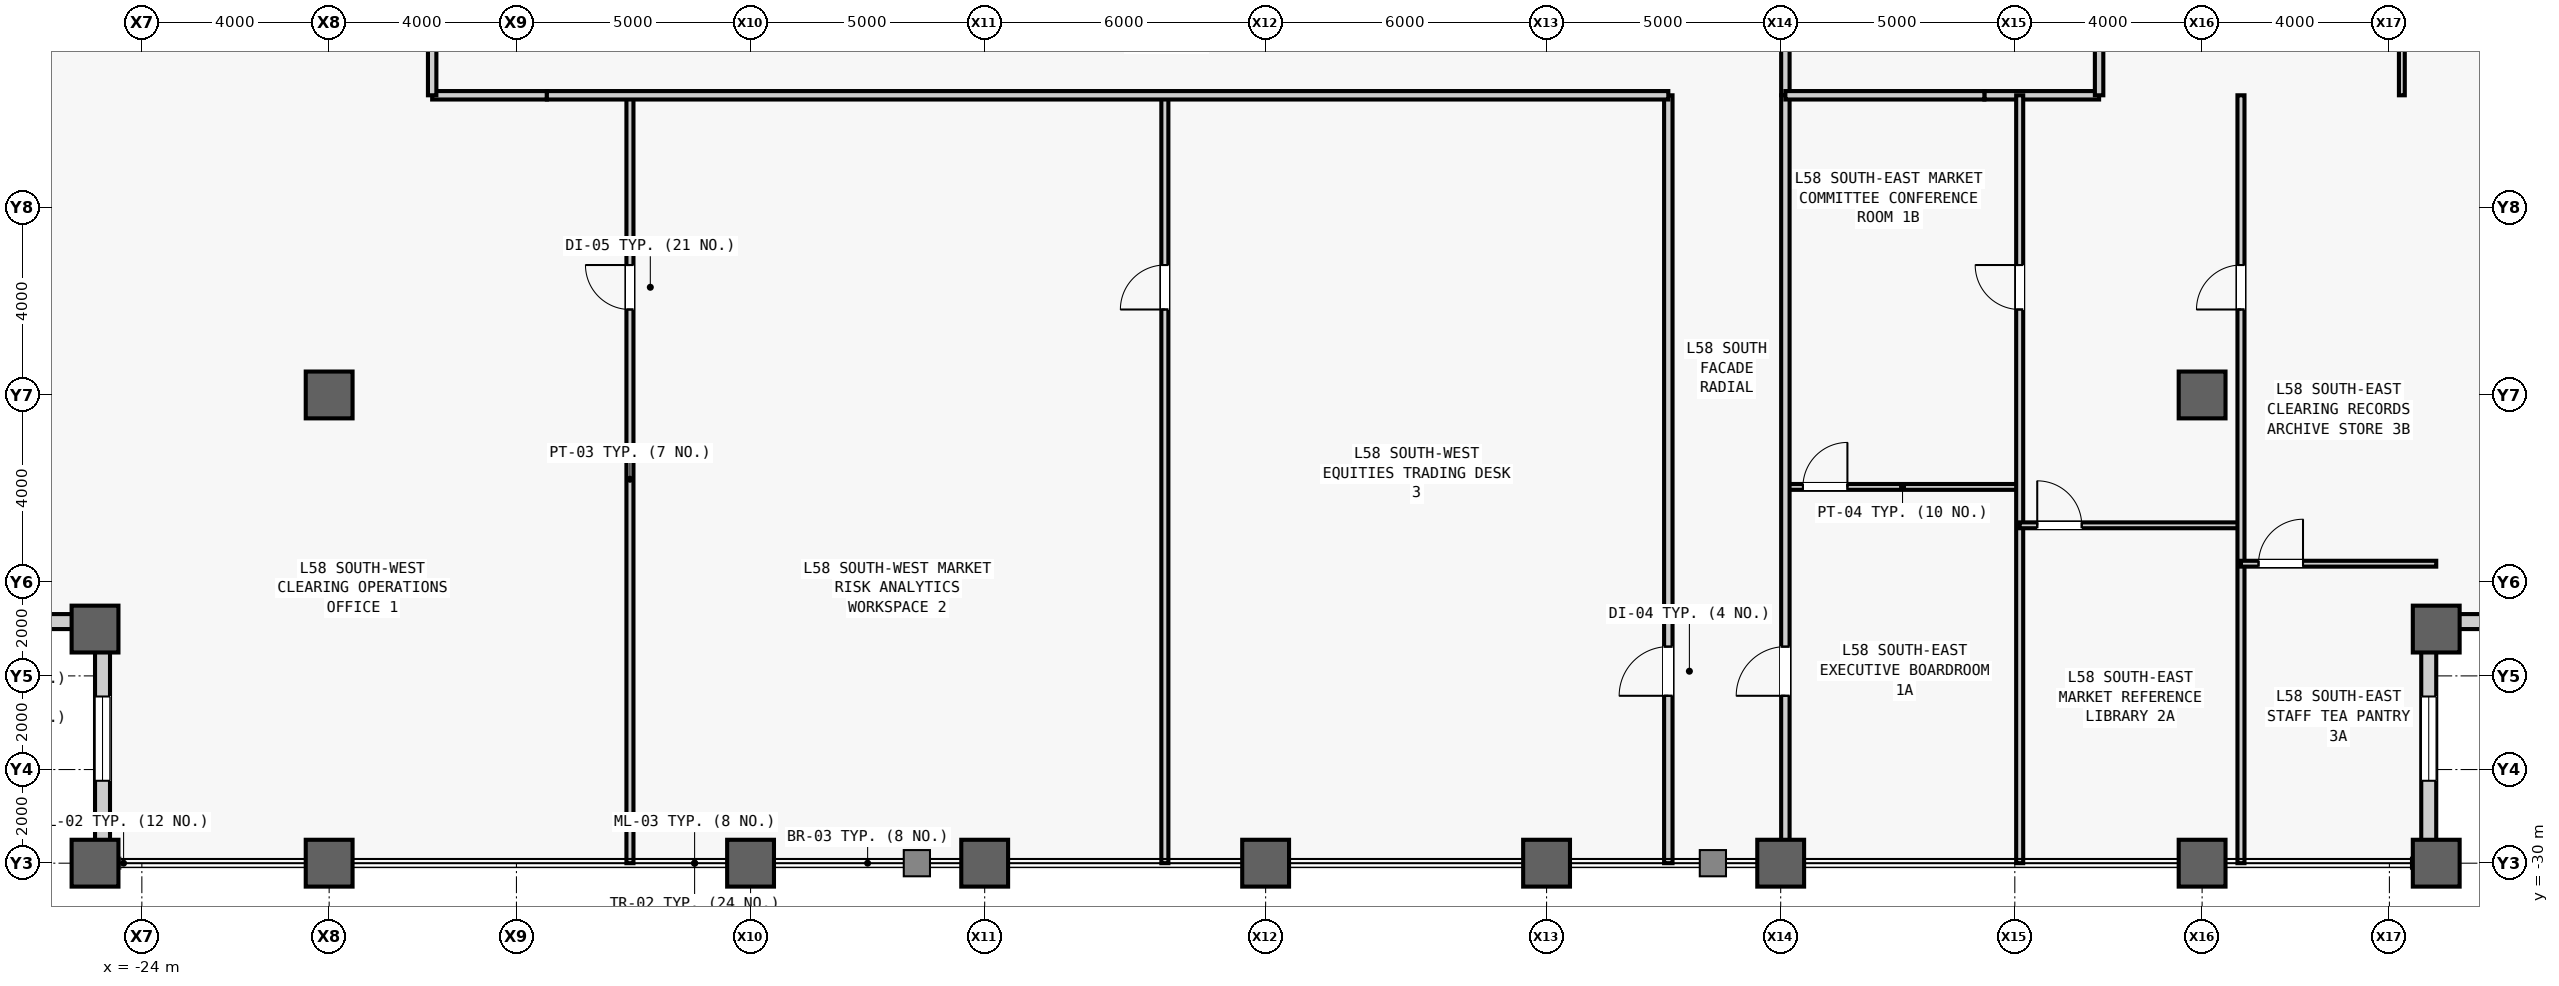
"""IFC4 building model, lengths in metres.
Left out: names, types, materials, properties, quantities, classifications, styles, units other than length and angle.
Written with IfcOpenShell. Run it as: python <this file> out.ifc"""

import sys

from ifc_helpers import new_model, si_unit, direction, frame, frame_2d, origin, origin_2d, place, context, subcontext, project, spatial, rectangle, hollow_rectangle, extrude, source, transform, mapped, element, fill, save


model = new_model("IFC4")
c1 = context("Model", 3, precision=1e-05, world=origin(), true_north=direction((0.0, 1.0)))
c2 = subcontext(c1, "Body", "Model", "MODEL_VIEW")
j1 = project(units=[si_unit("LENGTHUNIT", "METRE"), si_unit("PLANEANGLEUNIT", "RADIAN")], contexts=[c1])
p1 = place(None, origin())
s1 = spatial("IfcSite", under=j1, at=p1, CompositionType="ELEMENT")
p2 = place(p1, origin())
s2 = spatial("IfcBuilding", under=s1, at=p2, CompositionType="ELEMENT")
p3 = place(p2, frame((0.0, 0.0, 247.1)))
s3 = spatial("IfcBuildingStorey", under=s2, at=p3, CompositionType="ELEMENT", Elevation=247.1)
m1 = source(origin(), c2, "Body", "SweptSolid", [
    extrude(hollow_rectangle(XDim=1.0, YDim=1.0, WallThickness=0.055, at=origin_2d()), origin(), (0.0, 0.0, 1.0), 4.0),
])
for number, where, z_axis, x_axis in (
    (1, (-25.0, -30.0, 0.0), (0.0, 0.0, 1.0), (1.0, 0.0, 0.0)),
    (2, (-25.0, -25.0, 0.0), (0.0, 0.0, 1.0), (1.0, 0.0, 0.0)),
    (3, (-20.0, -30.0, 0.0), (0.0, 0.0, 1.0), (1.0, 0.0, 0.0)),
    (4, (-20.0, -20.0, 0.0), (0.0, 0.0, 1.0), (1.0, 0.0, 0.0)),
    (5, (-11.0, -30.0, 0.0), (0.0, 0.0, 1.0), (1.0, 0.0, 0.0)),
    (6, (-6.0, -30.0, 0.0), (0.0, 0.0, 1.0), (1.0, 0.0, 0.0)),
    (7, (0.0, -30.0, 0.0), (0.0, 0.0, 1.0), (1.0, 0.0, 0.0)),
    (8, (6.0, -30.0, 0.0), (0.0, 0.0, 1.0), (1.0, 0.0, 0.0)),
    (9, (11.0, -30.0, 0.0), (0.0, 0.0, 1.0), (1.0, 0.0, 0.0)),
    (10, (20.0, -30.0, 0.0), (0.0, 0.0, 1.0), (1.0, 0.0, 0.0)),
    (11, (20.0, -20.0, 0.0), (0.0, 0.0, 1.0), (1.0, 0.0, 0.0)),
    (12, (25.0, -30.0, 0.0), (0.0, 0.0, 1.0), (1.0, 0.0, 0.0)),
    (13, (25.0, -25.0, 0.0), (0.0, 0.0, 1.0), (1.0, 0.0, 0.0)),
):
    element("IfcColumn", number, at=place(p3, frame(where, z_axis=z_axis, x_axis=x_axis)), inside=s3, PredefinedType="COLUMN", context=c2, shape_type="MappedRepresentation", body=[
        mapped(m1, transform((0.0, 0.0, 0.0), scale=1.0)),
    ])
m2 = source(origin(), c2, "Body", "SweptSolid", [
    extrude(rectangle(XDim=4.68, YDim=0.32, at=frame_2d((2.34, 0.0))), origin(), (0.0, 0.0, 1.0), 3.164),
])
p4 = place(p3, frame((-25.0, -24.84, 0.0), z_axis=(0.0, 0.0, 1.0), x_axis=(-1.0, 0.0, 0.0)))
e14 = element("IfcWall", 14, at=p4, inside=s3, PredefinedType="STANDARD", context=c2, shape_type="MappedRepresentation", body=[
    mapped(m2, transform((0.0, 0.0, 0.0), scale=1.0)),
])
m3 = source(origin(), c2, "Body", "SweptSolid", [
    extrude(rectangle(XDim=1.8, YDim=2.4, at=frame_2d((0.9, 1.2))), frame((0.0, 0.17, 0.0), z_axis=(0.0, -1.0, 0.0), x_axis=(1.0, 0.0, 0.0)), (0.0, 0.0, 1.0), 0.34),
])
p5 = place(p4, frame((1.44, 0.0, 0.5)))
e15 = element("IfcOpeningElement", 15, at=p5, cuts=e14, PredefinedType="OPENING", context=c2, shape_type="MappedRepresentation", body=[
    mapped(m3, transform((0.0, 0.0, 0.0), scale=1.0)),
])
p6 = place(p3, frame((-24.84, -29.68, 0.0), z_axis=(0.0, 0.0, 1.0), x_axis=(0.0, 1.0, 0.0)))
e16 = element("IfcWall", 16, at=p6, inside=s3, PredefinedType="STANDARD", context=c2, shape_type="MappedRepresentation", body=[
    mapped(m2, transform((0.0, 0.0, 0.0), scale=1.0)),
])
p7 = place(p6, frame((1.44, 0.0, 0.5)))
e17 = element("IfcOpeningElement", 17, at=p7, cuts=e16, PredefinedType="OPENING", context=c2, shape_type="MappedRepresentation", body=[
    mapped(m3, transform((0.0, 0.0, 0.0), scale=1.0)),
])
p8 = place(p3, frame((24.84, -29.68, 0.0), z_axis=(0.0, 0.0, 1.0), x_axis=(0.0, 1.0, 0.0)))
e18 = element("IfcWall", 18, at=p8, inside=s3, PredefinedType="STANDARD", context=c2, shape_type="MappedRepresentation", body=[
    mapped(m2, transform((0.0, 0.0, 0.0), scale=1.0)),
])
p9 = place(p8, frame((1.44, 0.0, 0.5)))
e19 = element("IfcOpeningElement", 19, at=p9, cuts=e18, PredefinedType="OPENING", context=c2, shape_type="MappedRepresentation", body=[
    mapped(m3, transform((0.0, 0.0, 0.0), scale=1.0)),
])
p10 = place(p3, frame((25.0, -24.84, 0.0), z_axis=(0.0, 0.0, 1.0), x_axis=(1.0, 0.0, 0.0)))
e20 = element("IfcWall", 20, at=p10, inside=s3, PredefinedType="STANDARD", context=c2, shape_type="MappedRepresentation", body=[
    mapped(m2, transform((0.0, 0.0, 0.0), scale=1.0)),
])
p11 = place(p10, frame((1.44, 0.0, 0.5)))
e21 = element("IfcOpeningElement", 21, at=p11, cuts=e20, PredefinedType="OPENING", context=c2, shape_type="MappedRepresentation", body=[
    mapped(m3, transform((0.0, 0.0, 0.0), scale=1.0)),
])
m4 = source(origin(), c2, "Body", "SweptSolid", [
    extrude(rectangle(XDim=2.45, YDim=0.18, at=frame_2d((1.225, 0.0))), origin(), (0.0, 0.0, 1.0), 3.78),
])
for number, where, z_axis, x_axis in (
    (22, (15.35, -13.6, 0.0), (0.0, 0.0, 1.0), (1.0, 0.0, 0.0)),
    (23, (-17.8, -13.6, 0.0), (0.0, 0.0, 1.0), (1.0, 0.0, 0.0)),
):
    element("IfcWall", number, at=place(p3, frame(where, z_axis=z_axis, x_axis=x_axis)), inside=s3, PredefinedType="PARTITIONING", context=c2, shape_type="MappedRepresentation", body=[
        mapped(m4, transform((0.0, 0.0, 0.0), scale=1.0)),
    ])
m5 = source(origin(), c2, "Body", "SweptSolid", [
    extrude(rectangle(XDim=2.6, YDim=0.18, at=frame_2d((1.3, 0.0))), origin(), (0.0, 0.0, 1.0), 3.085),
])
p12 = place(p3, frame((11.1, -13.6, 0.0), z_axis=(0.0, 0.0, 1.0), x_axis=(0.0, 1.0, 0.0)))
e24 = element("IfcWall", 24, at=p12, inside=s3, PredefinedType="PARTITIONING", context=c2, shape_type="MappedRepresentation", body=[
    mapped(m5, transform((0.0, 0.0, 0.0), scale=1.0)),
])
m6 = source(origin(), c2, "Body", "SweptSolid", [
    extrude(rectangle(XDim=16.4, YDim=0.15, at=frame_2d((8.2, 0.0))), origin(), (0.0, 0.0, 1.0), 3.78),
])
p13 = place(p3, frame((-13.576, -30.0, 0.0), z_axis=(0.0, 0.0, 1.0), x_axis=(0.0, 1.0, 0.0)))
e25 = element("IfcWall", 25, at=p13, inside=s3, PredefinedType="PARTITIONING", context=c2, shape_type="MappedRepresentation", body=[
    mapped(m6, transform((0.0, 0.0, 0.0), scale=1.0)),
])
m7 = source(origin(), c2, "Body", "SweptSolid", [
    extrude(rectangle(XDim=0.95, YDim=2.15, at=frame_2d((0.475, 1.075))), frame((0.0, 0.085, 0.0), z_axis=(0.0, -1.0, 0.0), x_axis=(1.0, 0.0, 0.0)), (0.0, 0.0, 1.0), 0.17),
])
p14 = place(p13, frame((11.825, 0.0, 0.0)))
e26 = element("IfcOpeningElement", 26, at=p14, cuts=e25, PredefinedType="OPENING", context=c2, shape_type="MappedRepresentation", body=[
    mapped(m7, transform((0.0, 0.0, 0.0), scale=1.0)),
])
p15 = place(p3, frame((-2.152, -30.0, 0.0), z_axis=(0.0, 0.0, 1.0), x_axis=(0.0, 1.0, 0.0)))
e27 = element("IfcWall", 27, at=p15, inside=s3, PredefinedType="PARTITIONING", context=c2, shape_type="MappedRepresentation", body=[
    mapped(m6, transform((0.0, 0.0, 0.0), scale=1.0)),
])
p16 = place(p15, frame((11.825, 0.0, 0.0)))
e28 = element("IfcOpeningElement", 28, at=p16, cuts=e27, PredefinedType="OPENING", context=c2, shape_type="MappedRepresentation", body=[
    mapped(m7, transform((0.0, 0.0, 0.0), scale=1.0)),
])
m8 = source(origin(), c2, "Body", "SweptSolid", [
    extrude(rectangle(XDim=16.4, YDim=0.18, at=frame_2d((8.2, 0.0))), origin(), (0.0, 0.0, 1.0), 3.78),
])
p17 = place(p3, frame((8.6, -30.0, 0.0), z_axis=(0.0, 0.0, 1.0), x_axis=(0.0, 1.0, 0.0)))
e29 = element("IfcWall", 29, at=p17, inside=s3, PredefinedType="PARTITIONING", context=c2, shape_type="MappedRepresentation", body=[
    mapped(m8, transform((0.0, 0.0, 0.0), scale=1.0)),
])
m9 = source(origin(), c2, "Body", "SweptSolid", [
    extrude(rectangle(XDim=1.05, YDim=2.2, at=frame_2d((0.525, 1.1))), frame((0.0, 0.1, 0.0), z_axis=(0.0, -1.0, 0.0), x_axis=(1.0, 0.0, 0.0)), (0.0, 0.0, 1.0), 0.2),
])
p18 = place(p17, frame((3.575, 0.0, 0.0)))
e30 = element("IfcOpeningElement", 30, at=p18, cuts=e29, PredefinedType="OPENING", context=c2, shape_type="MappedRepresentation", body=[
    mapped(m9, transform((0.0, 0.0, 0.0), scale=1.0)),
])
m10 = source(origin(), c2, "Body", "SweptSolid", [
    extrude(rectangle(XDim=23.95, YDim=0.18, at=frame_2d((11.975, 0.0))), origin(), (0.0, 0.0, 1.0), 3.78),
])
p19 = place(p3, frame((-15.35, -13.6, 0.0), z_axis=(0.0, 0.0, 1.0), x_axis=(1.0, 0.0, 0.0)))
e31 = element("IfcWall", 31, at=p19, inside=s3, PredefinedType="PARTITIONING", context=c2, shape_type="MappedRepresentation", body=[
    mapped(m10, transform((0.0, 0.0, 0.0), scale=1.0)),
])
m11 = source(origin(), c2, "Body", "SweptSolid", [
    extrude(rectangle(XDim=5.004, YDim=0.125, at=frame_2d((2.502, 0.0))), origin(), (0.0, 0.0, 1.0), 3.78),
])
p20 = place(p3, frame((11.1, -21.964, 0.0), z_axis=(0.0, 0.0, 1.0), x_axis=(1.0, 0.0, 0.0)))
e32 = element("IfcWall", 32, at=p20, inside=s3, PredefinedType="PARTITIONING", context=c2, shape_type="MappedRepresentation", body=[
    mapped(m11, transform((0.0, 0.0, 0.0), scale=1.0)),
])
m12 = source(origin(), c2, "Body", "SweptSolid", [
    extrude(rectangle(XDim=0.95, YDim=2.15, at=frame_2d((0.475, 1.075))), frame((0.0, 0.073, 0.0), z_axis=(0.0, -1.0, 0.0), x_axis=(1.0, 0.0, 0.0)), (0.0, 0.0, 1.0), 0.145),
])
p21 = place(p20, frame((0.375, 0.0, 0.0)))
e33 = element("IfcOpeningElement", 33, at=p21, cuts=e32, PredefinedType="OPENING", context=c2, shape_type="MappedRepresentation", body=[
    mapped(m12, transform((0.0, 0.0, 0.0), scale=1.0)),
])
p22 = place(p3, frame((16.104, -30.0, 0.0), z_axis=(0.0, 0.0, 1.0), x_axis=(0.0, 1.0, 0.0)))
e34 = element("IfcWall", 34, at=p22, inside=s3, PredefinedType="PARTITIONING", context=c2, shape_type="MappedRepresentation", body=[
    mapped(m6, transform((0.0, 0.0, 0.0), scale=1.0)),
])
p23 = place(p22, frame((11.825, 0.0, 0.0)))
e35 = element("IfcOpeningElement", 35, at=p23, cuts=e34, PredefinedType="OPENING", context=c2, shape_type="MappedRepresentation", body=[
    mapped(m7, transform((0.0, 0.0, 0.0), scale=1.0)),
])
m13 = source(origin(), c2, "Body", "SweptSolid", [
    extrude(rectangle(XDim=4.726, YDim=0.125, at=frame_2d((2.363, 0.0))), origin(), (0.0, 0.0, 1.0), 3.78),
])
p24 = place(p3, frame((16.104, -22.784, 0.0), z_axis=(0.0, 0.0, 1.0), x_axis=(1.0, 0.0, 0.0)))
e36 = element("IfcWall", 36, at=p24, inside=s3, PredefinedType="PARTITIONING", context=c2, shape_type="MappedRepresentation", body=[
    mapped(m13, transform((0.0, 0.0, 0.0), scale=1.0)),
])
p25 = place(p24, frame((0.375, 0.0, 0.0)))
e37 = element("IfcOpeningElement", 37, at=p25, cuts=e36, PredefinedType="OPENING", context=c2, shape_type="MappedRepresentation", body=[
    mapped(m12, transform((0.0, 0.0, 0.0), scale=1.0)),
])
p26 = place(p3, frame((20.83, -30.0, 0.0), z_axis=(0.0, 0.0, 1.0), x_axis=(0.0, 1.0, 0.0)))
e38 = element("IfcWall", 38, at=p26, inside=s3, PredefinedType="PARTITIONING", context=c2, shape_type="MappedRepresentation", body=[
    mapped(m6, transform((0.0, 0.0, 0.0), scale=1.0)),
])
p27 = place(p26, frame((11.825, 0.0, 0.0)))
e39 = element("IfcOpeningElement", 39, at=p27, cuts=e38, PredefinedType="OPENING", context=c2, shape_type="MappedRepresentation", body=[
    mapped(m7, transform((0.0, 0.0, 0.0), scale=1.0)),
])
m14 = source(origin(), c2, "Body", "SweptSolid", [
    extrude(rectangle(XDim=4.17, YDim=0.125, at=frame_2d((2.085, 0.0))), origin(), (0.0, 0.0, 1.0), 3.78),
])
p28 = place(p3, frame((20.83, -23.604, 0.0), z_axis=(0.0, 0.0, 1.0), x_axis=(1.0, 0.0, 0.0)))
e40 = element("IfcWall", 40, at=p28, inside=s3, PredefinedType="PARTITIONING", context=c2, shape_type="MappedRepresentation", body=[
    mapped(m14, transform((0.0, 0.0, 0.0), scale=1.0)),
])
p29 = place(p28, frame((0.375, 0.0, 0.0)))
e41 = element("IfcOpeningElement", 41, at=p29, cuts=e40, PredefinedType="OPENING", context=c2, shape_type="MappedRepresentation", body=[
    mapped(m12, transform((0.0, 0.0, 0.0), scale=1.0)),
])
m15 = source(origin(), c2, "Body", "SweptSolid", [
    extrude(rectangle(XDim=16.4, YDim=0.18, at=frame_2d((8.2, 0.0))), origin(), (0.0, 0.0, 1.0), 3.085),
])
p30 = place(p3, frame((11.1, -30.0, 0.0), z_axis=(0.0, 0.0, 1.0), x_axis=(0.0, 1.0, 0.0)))
e42 = element("IfcWall", 42, at=p30, inside=s3, PredefinedType="PARTITIONING", context=c2, shape_type="MappedRepresentation", body=[
    mapped(m15, transform((0.0, 0.0, 0.0), scale=1.0)),
])
p31 = place(p30, frame((3.575, 0.0, 0.0)))
e43 = element("IfcOpeningElement", 43, at=p31, cuts=e42, PredefinedType="OPENING", context=c2, shape_type="MappedRepresentation", body=[
    mapped(m9, transform((0.0, 0.0, 0.0), scale=1.0)),
])
m16 = source(origin(), c2, "Body", "SweptSolid", [
    extrude(rectangle(XDim=4.25, YDim=0.18, at=frame_2d((2.125, 0.0))), origin(), (0.0, 0.0, 1.0), 3.78),
])
p32 = place(p3, frame((11.1, -13.6, 0.0), z_axis=(0.0, 0.0, 1.0), x_axis=(1.0, 0.0, 0.0)))
e44 = element("IfcWall", 44, at=p32, inside=s3, PredefinedType="PARTITIONING", context=c2, shape_type="MappedRepresentation", body=[
    mapped(m16, transform((0.0, 0.0, 0.0), scale=1.0)),
])
m17 = source(origin(), c2, "Body", "SweptSolid", [
    extrude(rectangle(XDim=15.8, YDim=0.18, at=frame_2d((7.9, 0.0))), origin(), (0.0, 0.0, 1.0), 3.78),
])
p33 = place(p3, frame((-17.8, -13.6, 0.0), z_axis=(0.0, 0.0, 1.0), x_axis=(0.0, 1.0, 0.0)))
e45 = element("IfcWall", 45, at=p33, inside=s3, PredefinedType="PARTITIONING", context=c2, shape_type="MappedRepresentation", body=[
    mapped(m17, transform((0.0, 0.0, 0.0), scale=1.0)),
])
m18 = source(origin(), c2, "Body", "SweptSolid", [
    extrude(rectangle(XDim=11.0, YDim=0.125, at=frame_2d((5.5, 0.0))), origin(), (0.0, 0.0, 1.0), 3.78),
])
p34 = place(p3, frame((24.266, -13.6, 0.0), z_axis=(0.0, 0.0, 1.0), x_axis=(0.0, 1.0, 0.0)))
e46 = element("IfcWall", 46, at=p34, inside=s3, PredefinedType="PARTITIONING", context=c2, shape_type="MappedRepresentation", body=[
    mapped(m18, transform((0.0, 0.0, 0.0), scale=1.0)),
])
m19 = source(origin(), c2, "Body", "SweptSolid", [
    extrude(rectangle(XDim=11.0, YDim=0.18, at=frame_2d((5.5, 0.0))), origin(), (0.0, 0.0, 1.0), 3.78),
])
p35 = place(p3, frame((17.8, -13.6, 0.0), z_axis=(0.0, 0.0, 1.0), x_axis=(0.0, 1.0, 0.0)))
e47 = element("IfcWall", 47, at=p35, inside=s3, PredefinedType="PARTITIONING", context=c2, shape_type="MappedRepresentation", body=[
    mapped(m19, transform((0.0, 0.0, 0.0), scale=1.0)),
])
m20 = source(origin(), c2, "Body", "SweptSolid", [
    extrude(rectangle(XDim=1.8, YDim=2.4, at=frame_2d((0.9, 1.2))), frame((0.0, 0.03, 0.0), z_axis=(0.0, -1.0, 0.0), x_axis=(1.0, 0.0, 0.0)), (0.0, 0.0, 1.0), 0.06),
])
p36 = place(p7, origin())
e48 = element("IfcWindow", 48, at=p36, inside=s3, PartitioningType="SINGLE_PANEL", PredefinedType="WINDOW", context=c2, shape_type="MappedRepresentation", body=[
    mapped(m20, transform((0.0, 0.0, 0.0), scale=1.0)),
])
fill(e17, e48)
p37 = place(p9, origin())
e49 = element("IfcWindow", 49, at=p37, inside=s3, PartitioningType="SINGLE_PANEL", PredefinedType="WINDOW", context=c2, shape_type="MappedRepresentation", body=[
    mapped(m20, transform((0.0, 0.0, 0.0), scale=1.0)),
])
fill(e19, e49)
m21 = source(origin(), c2, "Body", "SweptSolid", [
    extrude(rectangle(XDim=0.95, YDim=2.15, at=frame_2d((0.475, 1.075))), frame((0.0, 0.025, 0.0), z_axis=(0.0, -1.0, 0.0), x_axis=(1.0, 0.0, 0.0)), (0.0, 0.0, 1.0), 0.05),
])
p38 = place(p14, origin())
e50 = element("IfcDoor", 50, at=p38, inside=s3, OperationType="SINGLE_SWING_RIGHT", PredefinedType="DOOR", context=c2, shape_type="MappedRepresentation", body=[
    mapped(m21, transform((0.0, 0.0, 0.0), scale=1.0)),
])
fill(e26, e50)
p39 = place(p16, origin())
e51 = element("IfcDoor", 51, at=p39, inside=s3, OperationType="SINGLE_SWING_LEFT", PredefinedType="DOOR", context=c2, shape_type="MappedRepresentation", body=[
    mapped(m21, transform((0.0, 0.0, 0.0), scale=1.0)),
])
fill(e28, e51)
m22 = source(origin(), c2, "Body", "SweptSolid", [
    extrude(rectangle(XDim=1.05, YDim=2.2, at=frame_2d((0.525, 1.1))), frame((0.0, 0.025, 0.0), z_axis=(0.0, -1.0, 0.0), x_axis=(1.0, 0.0, 0.0)), (0.0, 0.0, 1.0), 0.05),
])
p40 = place(p18, origin())
e52 = element("IfcDoor", 52, at=p40, inside=s3, OperationType="SINGLE_SWING_LEFT", PredefinedType="DOOR", context=c2, shape_type="MappedRepresentation", body=[
    mapped(m22, transform((0.0, 0.0, 0.0), scale=1.0)),
])
fill(e30, e52)
p41 = place(p21, origin())
e53 = element("IfcDoor", 53, at=p41, inside=s3, OperationType="SINGLE_SWING_RIGHT", PredefinedType="DOOR", context=c2, shape_type="MappedRepresentation", body=[
    mapped(m21, transform((0.0, 0.0, 0.0), scale=1.0)),
])
fill(e33, e53)
p42 = place(p23, origin())
e54 = element("IfcDoor", 54, at=p42, inside=s3, OperationType="SINGLE_SWING_RIGHT", PredefinedType="DOOR", context=c2, shape_type="MappedRepresentation", body=[
    mapped(m21, transform((0.0, 0.0, 0.0), scale=1.0)),
])
fill(e35, e54)
p43 = place(p25, origin())
e55 = element("IfcDoor", 55, at=p43, inside=s3, OperationType="SINGLE_SWING_LEFT", PredefinedType="DOOR", context=c2, shape_type="MappedRepresentation", body=[
    mapped(m21, transform((0.0, 0.0, 0.0), scale=1.0)),
])
fill(e37, e55)
p44 = place(p27, origin())
e56 = element("IfcDoor", 56, at=p44, inside=s3, OperationType="SINGLE_SWING_LEFT", PredefinedType="DOOR", context=c2, shape_type="MappedRepresentation", body=[
    mapped(m21, transform((0.0, 0.0, 0.0), scale=1.0)),
])
fill(e39, e56)
p45 = place(p29, origin())
e57 = element("IfcDoor", 57, at=p45, inside=s3, OperationType="SINGLE_SWING_RIGHT", PredefinedType="DOOR", context=c2, shape_type="MappedRepresentation", body=[
    mapped(m21, transform((0.0, 0.0, 0.0), scale=1.0)),
])
fill(e41, e57)
p46 = place(p31, origin())
e58 = element("IfcDoor", 58, at=p46, inside=s3, OperationType="SINGLE_SWING_LEFT", PredefinedType="DOOR", context=c2, shape_type="MappedRepresentation", body=[
    mapped(m22, transform((0.0, 0.0, 0.0), scale=1.0)),
])
fill(e43, e58)
save(model, sys.argv[1])
